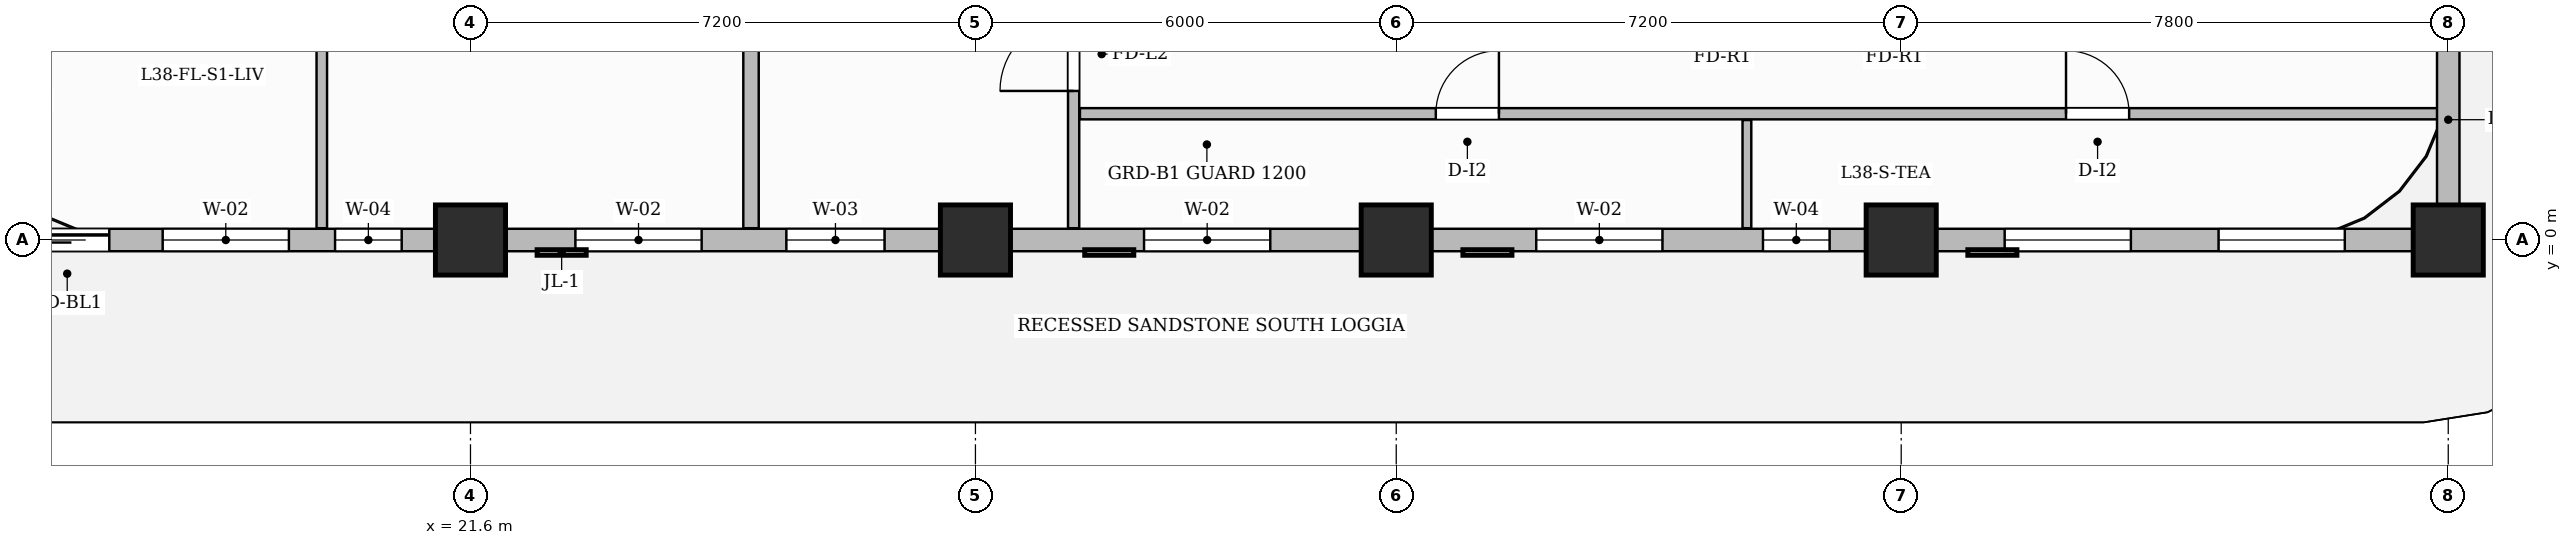
"""IFC4 building model, lengths in metres.
Left out: names, types, materials, properties, quantities, classifications, styles, units other than length and angle.
Written with IfcOpenShell. Run it as: python <this file> out.ifc"""

import sys

from ifc_helpers import new_model, si_unit, direction, frame, frame_2d, origin, origin_2d, place, context, subcontext, project, spatial, rectangle, extrude, source, transform, mapped, element, fill, save


model = new_model("IFC4")
c1 = context("Model", 3, precision=1e-05, world=origin(), true_north=direction((0.0, 1.0)))
c2 = subcontext(c1, "Body", "Model", "MODEL_VIEW")
j1 = project(units=[si_unit("LENGTHUNIT", "METRE"), si_unit("PLANEANGLEUNIT", "RADIAN")], contexts=[c1])
p1 = place(None, origin())
s1 = spatial("IfcSite", under=j1, at=p1, CompositionType="ELEMENT")
p2 = place(p1, origin())
s2 = spatial("IfcBuilding", under=s1, at=p2, CompositionType="ELEMENT")
p3 = place(p2, frame((0.0, 0.0, 154.15)))
s3 = spatial("IfcBuildingStorey", under=s2, at=p3, CompositionType="ELEMENT", Elevation=154.15)
m1 = source(origin(), c2, "Body", "SweptSolid", [
    extrude(rectangle(XDim=1.0, YDim=1.0, at=origin_2d()), origin(), (0.0, 0.0, 1.0), 3.85),
])
for number, where, z_axis, x_axis in (
    (1, (21.6, 0.0, 0.0), (0.0, 0.0, 1.0), (1.0, 0.0, 0.0)),
    (2, (28.8, 0.0, 0.0), (0.0, 0.0, 1.0), (1.0, 0.0, 0.0)),
    (3, (34.8, 0.0, 0.0), (0.0, 0.0, 1.0), (1.0, 0.0, 0.0)),
    (4, (42.0, 0.0, 0.0), (0.0, 0.0, 1.0), (1.0, 0.0, 0.0)),
    (5, (49.8, 0.0, 0.0), (0.0, 0.0, 1.0), (1.0, 0.0, 0.0)),
):
    element("IfcColumn", number, at=place(p3, frame(where, z_axis=z_axis, x_axis=x_axis)), inside=s3, PredefinedType="COLUMN", context=c2, shape_type="MappedRepresentation", body=[
        mapped(m1, transform((0.0, 0.0, 0.0), scale=1.0)),
    ])
p4 = place(p3, frame((30.2, 0.168, 0.0), z_axis=(0.0, 0.0, 1.0), x_axis=(0.0, 1.0, 0.0)))
e6 = element("IfcWall", 6, at=p4, inside=s3, PredefinedType="PARTITIONING", context=c2, shape_type="SweptSolid", body=[
    extrude(rectangle(XDim=9.692, YDim=0.16, at=frame_2d((4.846, 0.0))), origin(), (0.0, 0.0, 1.0), 3.6),
])
p5 = place(p4, frame((1.957, 0.0, 0.0)))
e7 = element("IfcOpeningElement", 7, at=p5, cuts=e6, PredefinedType="OPENING", context=c2, shape_type="SweptSolid", body=[
    extrude(rectangle(XDim=1.05, YDim=2.15, at=frame_2d((0.525, 1.075))), frame((0.0, 0.09, 0.0), z_axis=(0.0, -1.0, 0.0), x_axis=(1.0, 0.0, 0.0)), (0.0, 0.0, 1.0), 0.18),
])
p6 = place(p3, frame((30.29, 1.8, 0.0), z_axis=(0.0, 0.0, 1.0), x_axis=(1.0, 0.0, 0.0)))
e8 = element("IfcWall", 8, at=p6, inside=s3, PredefinedType="PARTITIONING", context=c2, shape_type="SweptSolid", body=[
    extrude(rectangle(XDim=19.37, YDim=0.16, at=frame_2d((9.685, 0.0))), origin(), (0.0, 0.0, 1.0), 3.6),
])
p7 = place(p6, frame((5.074, 0.0, 0.0)))
e9 = element("IfcOpeningElement", 9, at=p7, cuts=e8, PredefinedType="OPENING", context=c2, shape_type="SweptSolid", body=[
    extrude(rectangle(XDim=0.9, YDim=2.15, at=frame_2d((0.45, 1.075))), frame((0.0, 0.09, 0.0), z_axis=(0.0, -1.0, 0.0), x_axis=(1.0, 0.0, 0.0)), (0.0, 0.0, 1.0), 0.18),
])
p8 = place(p6, frame((14.06, 0.0, 0.0)))
e10 = element("IfcOpeningElement", 10, at=p8, cuts=e8, PredefinedType="OPENING", context=c2, shape_type="SweptSolid", body=[
    extrude(rectangle(XDim=0.9, YDim=2.15, at=frame_2d((0.45, 1.075))), frame((0.0, 0.09, 0.0), z_axis=(0.0, -1.0, 0.0), x_axis=(1.0, 0.0, 0.0)), (0.0, 0.0, 1.0), 0.18),
])
p9 = place(p3, frame((39.8, 0.168, 0.0), z_axis=(0.0, 0.0, 1.0), x_axis=(0.0, 1.0, 0.0)))
e11 = element("IfcWall", 11, at=p9, inside=s3, PredefinedType="PARTITIONING", context=c2, shape_type="SweptSolid", body=[
    extrude(rectangle(XDim=1.542, YDim=0.125, at=frame_2d((0.771, 0.0))), origin(), (0.0, 0.0, 1.0), 3.6),
])
p10 = place(p3, frame((25.6, 0.168, 0.0), z_axis=(0.0, 0.0, 1.0), x_axis=(0.0, 1.0, 0.0)))
e12 = element("IfcWall", 12, at=p10, inside=s3, PredefinedType="PARTITIONING", context=c2, shape_type="SweptSolid", body=[
    extrude(rectangle(XDim=9.692, YDim=0.22, at=frame_2d((4.846, 0.0))), origin(), (0.0, 0.0, 1.0), 3.6),
])
p11 = place(p3, frame((19.48, 0.168, 0.0), z_axis=(0.0, 0.0, 1.0), x_axis=(0.0, 1.0, 0.0)))
e13 = element("IfcWall", 13, at=p11, inside=s3, PredefinedType="PARTITIONING", context=c2, shape_type="SweptSolid", body=[
    extrude(rectangle(XDim=9.692, YDim=0.15, at=frame_2d((4.846, 0.0))), origin(), (0.0, 0.0, 1.0), 3.6),
])
p12 = place(p11, frame((8.257, 0.0, 0.0)))
e14 = element("IfcOpeningElement", 14, at=p12, cuts=e13, PredefinedType="OPENING", context=c2, shape_type="SweptSolid", body=[
    extrude(rectangle(XDim=0.9, YDim=2.15, at=frame_2d((0.45, 1.075))), frame((0.0, 0.085, 0.0), z_axis=(0.0, -1.0, 0.0), x_axis=(1.0, 0.0, 0.0)), (0.0, 0.0, 1.0), 0.17),
])
p13 = place(p3, frame((14.4, 0.0, 0.0), z_axis=(0.0, 0.0, 1.0), x_axis=(1.0, 0.0, 0.0)))
e15 = element("IfcWall", 15, at=p13, inside=s3, PredefinedType="SOLIDWALL", context=c2, shape_type="SweptSolid", body=[
    extrude(rectangle(XDim=35.4, YDim=0.32, at=frame_2d((17.7, 0.0))), origin(), (0.0, 0.0, 1.0), 3.085),
])
p14 = place(p13, frame((0.85, 0.0, 0.0)))
e16 = element("IfcOpeningElement", 16, at=p14, cuts=e15, PredefinedType="OPENING", context=c2, shape_type="SweptSolid", body=[
    extrude(rectangle(XDim=1.2, YDim=2.2, at=frame_2d((0.6, 1.1))), frame((0.0, 0.17, 0.0), z_axis=(0.0, -1.0, 0.0), x_axis=(1.0, 0.0, 0.0)), (0.0, 0.0, 1.0), 0.34),
])
p15 = place(p13, frame((2.811, 0.0, 0.8)))
e17 = element("IfcOpeningElement", 17, at=p15, cuts=e15, PredefinedType="OPENING", context=c2, shape_type="SweptSolid", body=[
    extrude(rectangle(XDim=1.8, YDim=1.85, at=frame_2d((0.9, 0.925))), frame((0.0, 0.17, 0.0), z_axis=(0.0, -1.0, 0.0), x_axis=(1.0, 0.0, 0.0)), (0.0, 0.0, 1.0), 0.34),
])
p16 = place(p13, frame((5.269, 0.0, 0.8)))
e18 = element("IfcOpeningElement", 18, at=p16, cuts=e15, PredefinedType="OPENING", context=c2, shape_type="SweptSolid", body=[
    extrude(rectangle(XDim=0.95, YDim=1.75, at=frame_2d((0.475, 0.875))), frame((0.0, 0.17, 0.0), z_axis=(0.0, -1.0, 0.0), x_axis=(1.0, 0.0, 0.0)), (0.0, 0.0, 1.0), 0.34),
])
p17 = place(p13, frame((8.696, 0.0, 0.8)))
e19 = element("IfcOpeningElement", 19, at=p17, cuts=e15, PredefinedType="OPENING", context=c2, shape_type="SweptSolid", body=[
    extrude(rectangle(XDim=1.8, YDim=1.85, at=frame_2d((0.9, 0.925))), frame((0.0, 0.17, 0.0), z_axis=(0.0, -1.0, 0.0), x_axis=(1.0, 0.0, 0.0)), (0.0, 0.0, 1.0), 0.34),
])
p18 = place(p13, frame((11.704, 0.0, 0.8)))
e20 = element("IfcOpeningElement", 20, at=p18, cuts=e15, PredefinedType="OPENING", context=c2, shape_type="SweptSolid", body=[
    extrude(rectangle(XDim=1.4, YDim=1.85, at=frame_2d((0.7, 0.925))), frame((0.0, 0.17, 0.0), z_axis=(0.0, -1.0, 0.0), x_axis=(1.0, 0.0, 0.0)), (0.0, 0.0, 1.0), 0.34),
])
p19 = place(p13, frame((16.804, 0.0, 0.8)))
e21 = element("IfcOpeningElement", 21, at=p19, cuts=e15, PredefinedType="OPENING", context=c2, shape_type="SweptSolid", body=[
    extrude(rectangle(XDim=1.8, YDim=1.85, at=frame_2d((0.9, 0.925))), frame((0.0, 0.17, 0.0), z_axis=(0.0, -1.0, 0.0), x_axis=(1.0, 0.0, 0.0)), (0.0, 0.0, 1.0), 0.34),
])
p20 = place(p13, frame((22.396, 0.0, 0.8)))
e22 = element("IfcOpeningElement", 22, at=p20, cuts=e15, PredefinedType="OPENING", context=c2, shape_type="SweptSolid", body=[
    extrude(rectangle(XDim=1.8, YDim=1.85, at=frame_2d((0.9, 0.925))), frame((0.0, 0.17, 0.0), z_axis=(0.0, -1.0, 0.0), x_axis=(1.0, 0.0, 0.0)), (0.0, 0.0, 1.0), 0.34),
])
p21 = place(p13, frame((25.629, 0.0, 0.8)))
e23 = element("IfcOpeningElement", 23, at=p21, cuts=e15, PredefinedType="OPENING", context=c2, shape_type="SweptSolid", body=[
    extrude(rectangle(XDim=0.95, YDim=1.75, at=frame_2d((0.475, 0.875))), frame((0.0, 0.17, 0.0), z_axis=(0.0, -1.0, 0.0), x_axis=(1.0, 0.0, 0.0)), (0.0, 0.0, 1.0), 0.34),
])
p22 = place(p13, frame((29.075, 0.0, 0.8)))
e24 = element("IfcOpeningElement", 24, at=p22, cuts=e15, PredefinedType="OPENING", context=c2, shape_type="SweptSolid", body=[
    extrude(rectangle(XDim=1.8, YDim=1.85, at=frame_2d((0.9, 0.925))), frame((0.0, 0.17, 0.0), z_axis=(0.0, -1.0, 0.0), x_axis=(1.0, 0.0, 0.0)), (0.0, 0.0, 1.0), 0.34),
])
p23 = place(p13, frame((32.125, 0.0, 0.8)))
e25 = element("IfcOpeningElement", 25, at=p23, cuts=e15, PredefinedType="OPENING", context=c2, shape_type="SweptSolid", body=[
    extrude(rectangle(XDim=1.8, YDim=1.85, at=frame_2d((0.9, 0.925))), frame((0.0, 0.17, 0.0), z_axis=(0.0, -1.0, 0.0), x_axis=(1.0, 0.0, 0.0)), (0.0, 0.0, 1.0), 0.34),
])
p24 = place(p3, frame((49.8, 0.05, 0.0), z_axis=(0.0, 0.0, 1.0), x_axis=(0.0, 1.0, 0.0)))
e26 = element("IfcWall", 26, at=p24, inside=s3, PredefinedType="SOLIDWALL", context=c2, shape_type="SweptSolid", body=[
    extrude(rectangle(XDim=3.33, YDim=0.32, at=frame_2d((1.665, 0.0))), origin(), (0.0, 0.0, 1.0), 3.6),
])
m2 = source(origin(), c2, "Body", "SweptSolid", [
    extrude(rectangle(XDim=1.05, YDim=2.15, at=frame_2d((0.525, 1.075))), frame((0.0, 0.025, 0.0), z_axis=(0.0, -1.0, 0.0), x_axis=(1.0, 0.0, 0.0)), (0.0, 0.0, 1.0), 0.05),
])
p25 = place(p5, origin())
e27 = element("IfcDoor", 27, at=p25, inside=s3, OperationType="SINGLE_SWING_LEFT", PredefinedType="DOOR", context=c2, shape_type="MappedRepresentation", body=[
    mapped(m2, transform((0.0, 0.0, 0.0), scale=1.0)),
])
fill(e7, e27)
m3 = source(origin(), c2, "Body", "SweptSolid", [
    extrude(rectangle(XDim=0.9, YDim=2.15, at=frame_2d((0.45, 1.075))), frame((0.0, 0.025, 0.0), z_axis=(0.0, -1.0, 0.0), x_axis=(1.0, 0.0, 0.0)), (0.0, 0.0, 1.0), 0.05),
])
p26 = place(p7, origin())
e28 = element("IfcDoor", 28, at=p26, inside=s3, OperationType="SINGLE_SWING_RIGHT", PredefinedType="DOOR", context=c2, shape_type="MappedRepresentation", body=[
    mapped(m3, transform((0.0, 0.0, 0.0), scale=1.0)),
])
fill(e9, e28)
p27 = place(p8, origin())
e29 = element("IfcDoor", 29, at=p27, inside=s3, OperationType="SINGLE_SWING_LEFT", PredefinedType="DOOR", context=c2, shape_type="MappedRepresentation", body=[
    mapped(m3, transform((0.0, 0.0, 0.0), scale=1.0)),
])
fill(e10, e29)
m4 = source(origin(), c2, "Body", "SweptSolid", [
    extrude(rectangle(XDim=1.2, YDim=2.2, at=frame_2d((0.6, 1.1))), frame((0.0, 0.025, 0.0), z_axis=(0.0, -1.0, 0.0), x_axis=(1.0, 0.0, 0.0)), (0.0, 0.0, 1.0), 0.05),
])
p28 = place(p14, origin())
e30 = element("IfcDoor", 30, at=p28, inside=s3, OperationType="SLIDING_TO_LEFT", PredefinedType="DOOR", context=c2, shape_type="MappedRepresentation", body=[
    mapped(m4, transform((0.0, 0.0, 0.0), scale=1.0)),
])
fill(e16, e30)
m5 = source(origin(), c2, "Body", "SweptSolid", [
    extrude(rectangle(XDim=1.8, YDim=1.85, at=frame_2d((0.9, 0.925))), frame((0.0, 0.03, 0.0), z_axis=(0.0, -1.0, 0.0), x_axis=(1.0, 0.0, 0.0)), (0.0, 0.0, 1.0), 0.06),
])
p29 = place(p15, origin())
e31 = element("IfcWindow", 31, at=p29, inside=s3, PartitioningType="DOUBLE_PANEL_VERTICAL", PredefinedType="WINDOW", context=c2, shape_type="MappedRepresentation", body=[
    mapped(m5, transform((0.0, 0.0, 0.0), scale=1.0)),
])
fill(e17, e31)
m6 = source(origin(), c2, "Body", "SweptSolid", [
    extrude(rectangle(XDim=0.95, YDim=1.75, at=frame_2d((0.475, 0.875))), frame((0.0, 0.03, 0.0), z_axis=(0.0, -1.0, 0.0), x_axis=(1.0, 0.0, 0.0)), (0.0, 0.0, 1.0), 0.06),
])
p30 = place(p16, origin())
e32 = element("IfcWindow", 32, at=p30, inside=s3, PartitioningType="SINGLE_PANEL", PredefinedType="WINDOW", context=c2, shape_type="MappedRepresentation", body=[
    mapped(m6, transform((0.0, 0.0, 0.0), scale=1.0)),
])
fill(e18, e32)
p31 = place(p17, origin())
e33 = element("IfcWindow", 33, at=p31, inside=s3, PartitioningType="DOUBLE_PANEL_VERTICAL", PredefinedType="WINDOW", context=c2, shape_type="MappedRepresentation", body=[
    mapped(m5, transform((0.0, 0.0, 0.0), scale=1.0)),
])
fill(e19, e33)
m7 = source(origin(), c2, "Body", "SweptSolid", [
    extrude(rectangle(XDim=1.4, YDim=1.85, at=frame_2d((0.7, 0.925))), frame((0.0, 0.03, 0.0), z_axis=(0.0, -1.0, 0.0), x_axis=(1.0, 0.0, 0.0)), (0.0, 0.0, 1.0), 0.06),
])
p32 = place(p18, origin())
e34 = element("IfcWindow", 34, at=p32, inside=s3, PartitioningType="SINGLE_PANEL", PredefinedType="WINDOW", context=c2, shape_type="MappedRepresentation", body=[
    mapped(m7, transform((0.0, 0.0, 0.0), scale=1.0)),
])
fill(e20, e34)
p33 = place(p19, origin())
e35 = element("IfcWindow", 35, at=p33, inside=s3, PartitioningType="DOUBLE_PANEL_VERTICAL", PredefinedType="WINDOW", context=c2, shape_type="MappedRepresentation", body=[
    mapped(m5, transform((0.0, 0.0, 0.0), scale=1.0)),
])
fill(e21, e35)
p34 = place(p20, origin())
e36 = element("IfcWindow", 36, at=p34, inside=s3, PartitioningType="DOUBLE_PANEL_VERTICAL", PredefinedType="WINDOW", context=c2, shape_type="MappedRepresentation", body=[
    mapped(m5, transform((0.0, 0.0, 0.0), scale=1.0)),
])
fill(e22, e36)
p35 = place(p21, origin())
e37 = element("IfcWindow", 37, at=p35, inside=s3, PartitioningType="SINGLE_PANEL", PredefinedType="WINDOW", context=c2, shape_type="MappedRepresentation", body=[
    mapped(m6, transform((0.0, 0.0, 0.0), scale=1.0)),
])
fill(e23, e37)
p36 = place(p22, origin())
e38 = element("IfcWindow", 38, at=p36, inside=s3, PartitioningType="DOUBLE_PANEL_VERTICAL", PredefinedType="WINDOW", context=c2, shape_type="MappedRepresentation", body=[
    mapped(m5, transform((0.0, 0.0, 0.0), scale=1.0)),
])
fill(e24, e38)
p37 = place(p23, origin())
e39 = element("IfcWindow", 39, at=p37, inside=s3, PartitioningType="DOUBLE_PANEL_VERTICAL", PredefinedType="WINDOW", context=c2, shape_type="MappedRepresentation", body=[
    mapped(m5, transform((0.0, 0.0, 0.0), scale=1.0)),
])
fill(e25, e39)
save(model, sys.argv[1])
